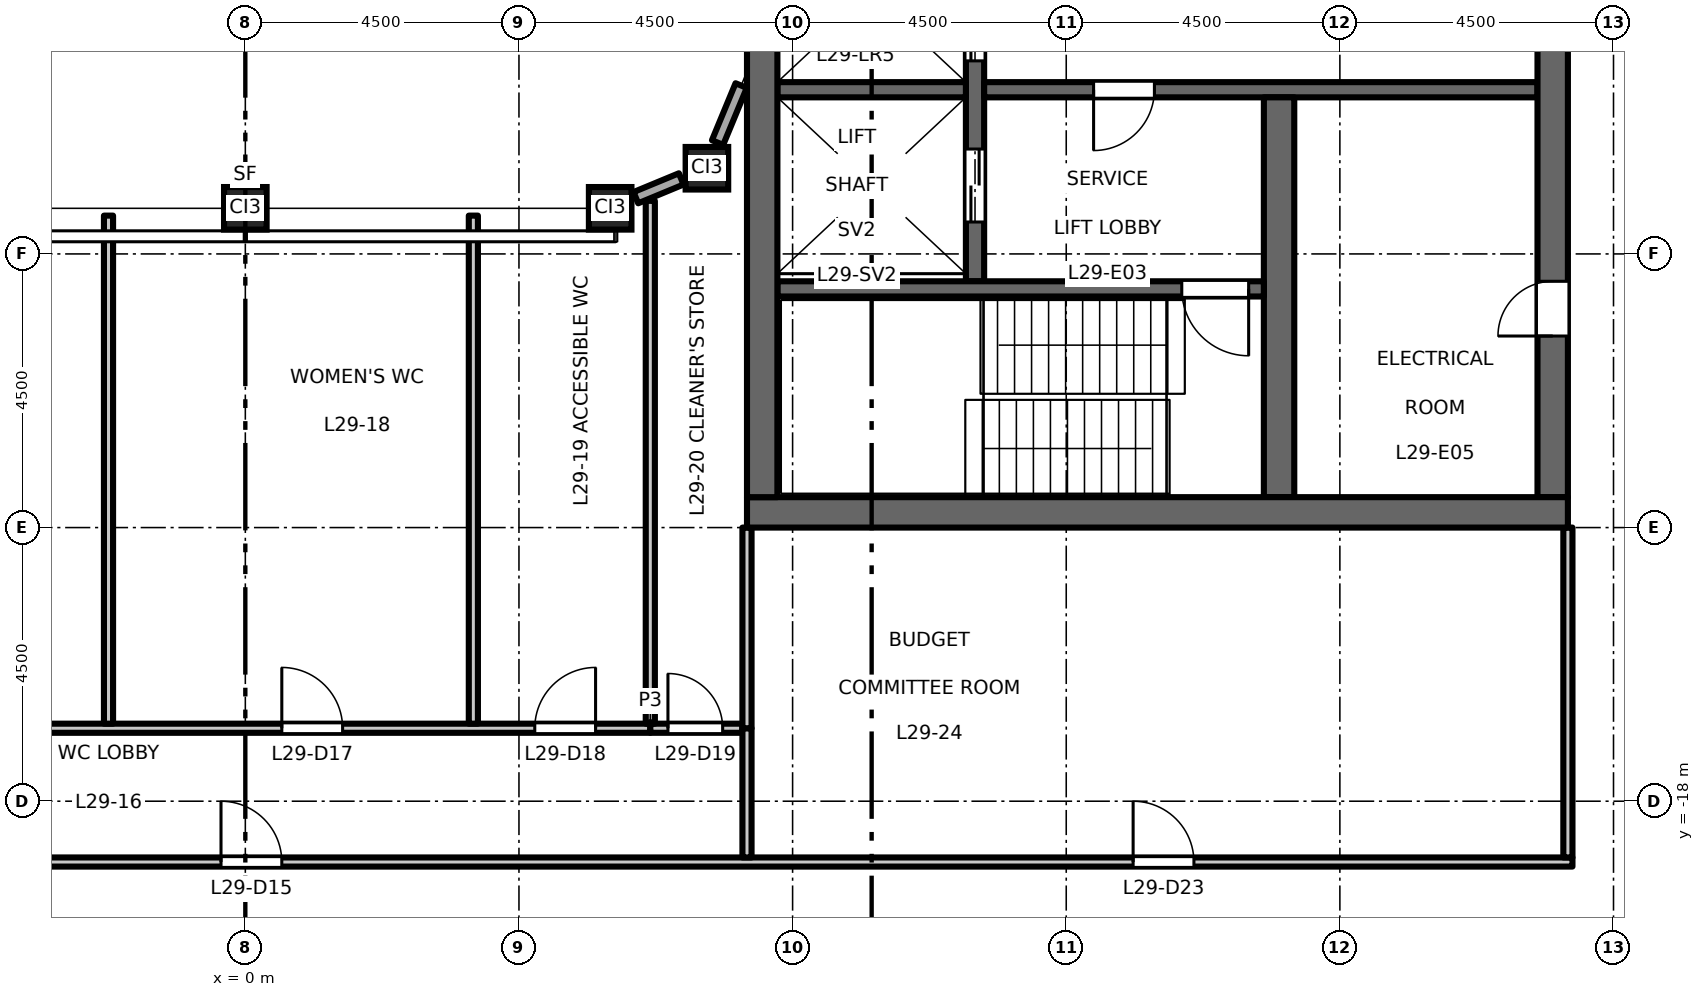
"""IFC4 building model, lengths in metres.
Left out: names, types, materials, properties, quantities, classifications, styles, units other than length and angle.
Written with IfcOpenShell. Run it as: python <this file> out.ifc"""

import sys

from ifc_helpers import new_model, si_unit, direction, frame, frame_2d, origin, origin_2d, place, context, subcontext, project, spatial, rectangle, hollow_rectangle, extrude, element, fill, save


model = new_model("IFC4")
c1 = context("Model", 3, precision=1e-05, world=origin(), true_north=direction((0.0, 1.0)))
c2 = subcontext(c1, "Body", "Model", "MODEL_VIEW")
j1 = project(units=[si_unit("LENGTHUNIT", "METRE"), si_unit("PLANEANGLEUNIT", "RADIAN")], contexts=[c1])
p1 = place(None, origin())
s1 = spatial("IfcSite", under=j1, at=p1, CompositionType="ELEMENT")
p2 = place(p1, origin())
s2 = spatial("IfcBuilding", under=s1, at=p2, CompositionType="ELEMENT")
p3 = place(p2, frame((0.0, 0.0, 136.2)))
s3 = spatial("IfcBuildingStorey", under=s2, at=p3, CompositionType="ELEMENT", Elevation=136.2)
for number, where, z_axis, x_axis in (
    (1, (0.0, -8.25, 0.0), (0.0, 0.0, 1.0), (1.0, 0.0, 0.0)),
    (2, (6.0, -8.25, 0.0), (0.0, 0.0, 1.0), (1.0, 0.0, 0.0)),
    (3, (7.591, -7.591, 0.0), (0.0, 0.0, 1.0), (1.0, 0.0, 0.0)),
):
    element("IfcColumn", number, at=place(p3, frame(where, z_axis=z_axis, x_axis=x_axis)), inside=s3, PredefinedType="COLUMN", context=c2, shape_type="SweptSolid", body=[
        extrude(hollow_rectangle(XDim=0.7, YDim=0.7, WallThickness=0.04, at=origin_2d()), origin(), (0.0, 0.0, 1.0), 4.5),
    ])
p4 = place(p3, frame((12.0, -9.45, 0.0), z_axis=(0.0, 0.0, 1.0), x_axis=(0.0, 1.0, 0.0)))
e4 = element("IfcWall", 4, at=p4, inside=s3, PredefinedType="SHEAR", context=c2, shape_type="SweptSolid", body=[
    extrude(rectangle(XDim=18.9, YDim=0.3, at=frame_2d((9.45, 0.0))), origin(), (0.0, 0.0, 1.0), 4.35),
])
p5 = place(p4, frame((3.625, 0.0, 0.0)))
e5 = element("IfcOpeningElement", 5, at=p5, cuts=e4, PredefinedType="OPENING", context=c2, shape_type="SweptSolid", body=[
    extrude(rectangle(XDim=1.1, YDim=2.1, at=frame_2d((0.55, 1.05))), frame((0.0, 0.16, 0.0), z_axis=(0.0, -1.0, 0.0), x_axis=(1.0, 0.0, 0.0)), (0.0, 0.0, 1.0), 0.32),
])
p6 = place(p4, frame((6.775, 0.0, 0.0)))
e6 = element("IfcOpeningElement", 6, at=p6, cuts=e4, PredefinedType="OPENING", context=c2, shape_type="SweptSolid", body=[
    extrude(rectangle(XDim=1.1, YDim=2.1, at=frame_2d((0.55, 1.05))), frame((0.0, 0.16, 0.0), z_axis=(0.0, -1.0, 0.0), x_axis=(1.0, 0.0, 0.0)), (0.0, 0.0, 1.0), 0.32),
])
p7 = place(p4, frame((9.925, 0.0, 0.0)))
e7 = element("IfcOpeningElement", 7, at=p7, cuts=e4, PredefinedType="OPENING", context=c2, shape_type="SweptSolid", body=[
    extrude(rectangle(XDim=1.1, YDim=2.1, at=frame_2d((0.55, 1.05))), frame((0.0, 0.16, 0.0), z_axis=(0.0, -1.0, 0.0), x_axis=(1.0, 0.0, 0.0)), (0.0, 0.0, 1.0), 0.32),
])
p8 = place(p4, frame((13.075, 0.0, 0.0)))
e8 = element("IfcOpeningElement", 8, at=p8, cuts=e4, PredefinedType="OPENING", context=c2, shape_type="SweptSolid", body=[
    extrude(rectangle(XDim=1.1, YDim=2.1, at=frame_2d((0.55, 1.05))), frame((0.0, 0.16, 0.0), z_axis=(0.0, -1.0, 0.0), x_axis=(1.0, 0.0, 0.0)), (0.0, 0.0, 1.0), 0.32),
])
p9 = place(p4, frame((16.725, 0.0, 0.0)))
e9 = element("IfcOpeningElement", 9, at=p9, cuts=e4, PredefinedType="OPENING", context=c2, shape_type="SweptSolid", body=[
    extrude(rectangle(XDim=1.2, YDim=2.1, at=frame_2d((0.6, 1.05))), frame((0.0, 0.16, 0.0), z_axis=(0.0, -1.0, 0.0), x_axis=(1.0, 0.0, 0.0)), (0.0, 0.0, 1.0), 0.32),
])
p10 = place(p4, frame((0.975, 0.0, 0.0)))
e10 = element("IfcOpeningElement", 10, at=p10, cuts=e4, PredefinedType="OPENING", context=c2, shape_type="SweptSolid", body=[
    extrude(rectangle(XDim=1.2, YDim=2.1, at=frame_2d((0.6, 1.05))), frame((0.0, 0.16, 0.0), z_axis=(0.0, -1.0, 0.0), x_axis=(1.0, 0.0, 0.0)), (0.0, 0.0, 1.0), 0.32),
])
p11 = place(p3, frame((12.15, -6.3, 0.0), z_axis=(0.0, 0.0, 1.0), x_axis=(1.0, 0.0, 0.0)))
e11 = element("IfcWall", 11, at=p11, inside=s3, PredefinedType="SHEAR", context=c2, shape_type="SweptSolid", body=[
    extrude(rectangle(XDim=9.1, YDim=0.25, at=frame_2d((4.55, 0.0))), origin(), (0.0, 0.0, 1.0), 4.35),
])
p12 = place(p11, frame((1.8, 0.0, 0.0)))
e12 = element("IfcOpeningElement", 12, at=p12, cuts=e11, PredefinedType="OPENING", context=c2, shape_type="SweptSolid", body=[
    extrude(rectangle(XDim=1.0, YDim=2.1, at=frame_2d((0.5, 1.05))), frame((0.0, 0.135, 0.0), z_axis=(0.0, -1.0, 0.0), x_axis=(1.0, 0.0, 0.0)), (0.0, 0.0, 1.0), 0.27),
])
p13 = place(p3, frame((21.5, -13.0, 0.0), z_axis=(0.0, 0.0, 1.0), x_axis=(0.0, 1.0, 0.0)))
e13 = element("IfcWall", 13, at=p13, inside=s3, PredefinedType="SHEAR", context=c2, shape_type="SweptSolid", body=[
    extrude(rectangle(XDim=26.0, YDim=0.5, at=frame_2d((13.0, 0.0))), origin(), (0.0, 0.0, 1.0), 4.35),
])
p14 = place(p13, frame((16.825, 0.0, 0.0)))
e14 = element("IfcOpeningElement", 14, at=p14, cuts=e13, PredefinedType="OPENING", context=c2, shape_type="SweptSolid", body=[
    extrude(rectangle(XDim=1.8, YDim=2.1, at=frame_2d((0.9, 1.05))), frame((0.0, 0.26, 0.0), z_axis=(0.0, -1.0, 0.0), x_axis=(1.0, 0.0, 0.0)), (0.0, 0.0, 1.0), 0.52),
])
p15 = place(p13, frame((7.375, 0.0, 0.0)))
e15 = element("IfcOpeningElement", 15, at=p15, cuts=e13, PredefinedType="OPENING", context=c2, shape_type="SweptSolid", body=[
    extrude(rectangle(XDim=1.8, YDim=2.1, at=frame_2d((0.9, 1.05))), frame((0.0, 0.26, 0.0), z_axis=(0.0, -1.0, 0.0), x_axis=(1.0, 0.0, 0.0)), (0.0, 0.0, 1.0), 0.52),
])
p16 = place(p13, frame((2.65, 0.0, 0.0)))
e16 = element("IfcOpeningElement", 16, at=p16, cuts=e13, PredefinedType="OPENING", context=c2, shape_type="SweptSolid", body=[
    extrude(rectangle(XDim=0.9, YDim=2.1, at=frame_2d((0.45, 1.05))), frame((0.0, 0.26, 0.0), z_axis=(0.0, -1.0, 0.0), x_axis=(1.0, 0.0, 0.0)), (0.0, 0.0, 1.0), 0.52),
])
p17 = place(p3, frame((17.0, -13.0, 0.0), z_axis=(0.0, 0.0, 1.0), x_axis=(0.0, 1.0, 0.0)))
e17 = element("IfcWall", 17, at=p17, inside=s3, PredefinedType="SHEAR", context=c2, shape_type="SweptSolid", body=[
    extrude(rectangle(XDim=6.575, YDim=0.5, at=frame_2d((3.288, 0.0))), origin(), (0.0, 0.0, 1.0), 4.35),
])
p18 = place(p3, frame((8.75, -6.3, 0.0), z_axis=(0.0, 0.0, 1.0), x_axis=(1.0, 0.0, 0.0)))
e18 = element("IfcWall", 18, at=p18, inside=s3, PredefinedType="SHEAR", context=c2, shape_type="SweptSolid", body=[
    extrude(rectangle(XDim=3.1, YDim=0.25, at=frame_2d((1.55, 0.0))), origin(), (0.0, 0.0, 1.0), 4.35),
])
p19 = place(p3, frame((8.75, -9.575, 0.0), z_axis=(0.0, 0.0, 1.0), x_axis=(1.0, 0.0, 0.0)))
e19 = element("IfcWall", 19, at=p19, inside=s3, PredefinedType="SHEAR", context=c2, shape_type="SweptSolid", body=[
    extrude(rectangle(XDim=8.0, YDim=0.25, at=frame_2d((4.0, 0.0))), origin(), (0.0, 0.0, 1.0), 4.35),
])
p20 = place(p19, frame((6.65, 0.0, 0.0)))
e20 = element("IfcOpeningElement", 20, at=p20, cuts=e19, PredefinedType="OPENING", context=c2, shape_type="SweptSolid", body=[
    extrude(rectangle(XDim=1.1, YDim=2.1, at=frame_2d((0.55, 1.05))), frame((0.0, 0.135, 0.0), z_axis=(0.0, -1.0, 0.0), x_axis=(1.0, 0.0, 0.0)), (0.0, 0.0, 1.0), 0.27),
])
p21 = place(p3, frame((8.25, -13.25, 0.0), z_axis=(0.0, 0.0, 1.0), x_axis=(1.0, 0.0, 0.0)))
e21 = element("IfcWall", 21, at=p21, inside=s3, PredefinedType="SHEAR", context=c2, shape_type="SweptSolid", body=[
    extrude(rectangle(XDim=13.5, YDim=0.5, at=frame_2d((6.75, 0.0))), origin(), (0.0, 0.0, 1.0), 4.35),
])
p22 = place(p3, frame((8.5, -13.0, 0.0), z_axis=(0.0, 0.0, 1.0), x_axis=(0.0, 1.0, 0.0)))
e22 = element("IfcWall", 22, at=p22, inside=s3, PredefinedType="SHEAR", context=c2, shape_type="SweptSolid", body=[
    extrude(rectangle(XDim=26.0, YDim=0.5, at=frame_2d((13.0, 0.0))), origin(), (0.0, 0.0, 1.0), 4.35),
])
p23 = place(p3, frame((6.423, -8.075, 0.0), z_axis=(0.0, 0.0, 1.0), x_axis=(0.923817771127, 0.382832503518, 0.0)))
e23 = element("IfcWall", 23, at=p23, inside=s3, PredefinedType="STANDARD", context=c2, shape_type="SweptSolid", body=[
    extrude(rectangle(XDim=0.807, YDim=0.2, at=frame_2d((0.404, 0.0))), origin(), (0.0, 0.0, 1.0), 3.826),
])
p24 = place(p3, frame((7.766, -7.168, 0.0), z_axis=(0.0, 0.0, 1.0), x_axis=(0.382769662028, 0.923843810301, 0.0)))
e24 = element("IfcWall", 24, at=p24, inside=s3, PredefinedType="STANDARD", context=c2, shape_type="SweptSolid", body=[
    extrude(rectangle(XDim=1.015, YDim=0.2, at=frame_2d((0.507, 0.0))), origin(), (0.0, 0.0, 1.0), 3.826),
])
p25 = place(p3, frame((-21.825, -19.0, 0.0), z_axis=(0.0, 0.0, 1.0), x_axis=(1.0, 0.0, 0.0)))
e25 = element("IfcWall", 25, at=p25, inside=s3, PredefinedType="PARTITIONING", context=c2, shape_type="SweptSolid", body=[
    extrude(rectangle(XDim=43.65, YDim=0.15, at=frame_2d((21.825, 0.0))), origin(), (0.0, 0.0, 1.0), 4.35),
])
p26 = place(p25, frame((21.425, 0.0, 0.0)))
e26 = element("IfcOpeningElement", 26, at=p26, cuts=e25, PredefinedType="OPENING", context=c2, shape_type="SweptSolid", body=[
    extrude(rectangle(XDim=1.0, YDim=2.1, at=frame_2d((0.5, 1.05))), frame((0.0, 0.085, 0.0), z_axis=(0.0, -1.0, 0.0), x_axis=(1.0, 0.0, 0.0)), (0.0, 0.0, 1.0), 0.17),
])
p27 = place(p25, frame((6.425, 0.0, 0.0)))
e27 = element("IfcOpeningElement", 27, at=p27, cuts=e25, PredefinedType="OPENING", context=c2, shape_type="SweptSolid", body=[
    extrude(rectangle(XDim=1.0, YDim=2.1, at=frame_2d((0.5, 1.05))), frame((0.0, 0.085, 0.0), z_axis=(0.0, -1.0, 0.0), x_axis=(1.0, 0.0, 0.0)), (0.0, 0.0, 1.0), 0.17),
])
p28 = place(p25, frame((36.425, 0.0, 0.0)))
e28 = element("IfcOpeningElement", 28, at=p28, cuts=e25, PredefinedType="OPENING", context=c2, shape_type="SweptSolid", body=[
    extrude(rectangle(XDim=1.0, YDim=2.1, at=frame_2d((0.5, 1.05))), frame((0.0, 0.085, 0.0), z_axis=(0.0, -1.0, 0.0), x_axis=(1.0, 0.0, 0.0)), (0.0, 0.0, 1.0), 0.17),
])
p29 = place(p3, frame((-8.175, -16.8, 0.0), z_axis=(0.0, 0.0, 1.0), x_axis=(1.0, 0.0, 0.0)))
e29 = element("IfcWall", 29, at=p29, inside=s3, PredefinedType="PARTITIONING", context=c2, shape_type="SweptSolid", body=[
    extrude(rectangle(XDim=14.835, YDim=0.15, at=frame_2d((7.417, 0.0))), origin(), (0.0, 0.0, 1.0), 4.35),
])
p30 = place(p29, frame((2.525, 0.0, 0.0)))
e30 = element("IfcOpeningElement", 30, at=p30, cuts=e29, PredefinedType="OPENING", context=c2, shape_type="SweptSolid", body=[
    extrude(rectangle(XDim=1.0, YDim=2.1, at=frame_2d((0.5, 1.05))), frame((0.0, 0.085, 0.0), z_axis=(0.0, -1.0, 0.0), x_axis=(1.0, 0.0, 0.0)), (0.0, 0.0, 1.0), 0.17),
])
p31 = place(p29, frame((8.775, 0.0, 0.0)))
e31 = element("IfcOpeningElement", 31, at=p31, cuts=e29, PredefinedType="OPENING", context=c2, shape_type="SweptSolid", body=[
    extrude(rectangle(XDim=1.0, YDim=2.1, at=frame_2d((0.5, 1.05))), frame((0.0, 0.085, 0.0), z_axis=(0.0, -1.0, 0.0), x_axis=(1.0, 0.0, 0.0)), (0.0, 0.0, 1.0), 0.17),
])
p32 = place(p29, frame((12.935, 0.0, 0.0)))
e32 = element("IfcOpeningElement", 32, at=p32, cuts=e29, PredefinedType="OPENING", context=c2, shape_type="SweptSolid", body=[
    extrude(rectangle(XDim=1.0, YDim=2.1, at=frame_2d((0.5, 1.05))), frame((0.0, 0.085, 0.0), z_axis=(0.0, -1.0, 0.0), x_axis=(1.0, 0.0, 0.0)), (0.0, 0.0, 1.0), 0.17),
])
p33 = place(p3, frame((6.66, -16.8, 0.0), z_axis=(0.0, 0.0, 1.0), x_axis=(1.0, 0.0, 0.0)))
e33 = element("IfcWall", 33, at=p33, inside=s3, PredefinedType="PARTITIONING", context=c2, shape_type="SweptSolid", body=[
    extrude(rectangle(XDim=1.515, YDim=0.15, at=frame_2d((0.758, 0.0))), origin(), (0.0, 0.0, 1.0), 4.35),
])
p34 = place(p33, frame((0.29, 0.0, 0.0)))
e34 = element("IfcOpeningElement", 34, at=p34, cuts=e33, PredefinedType="OPENING", context=c2, shape_type="SweptSolid", body=[
    extrude(rectangle(XDim=0.9, YDim=2.1, at=frame_2d((0.45, 1.05))), frame((0.0, 0.085, 0.0), z_axis=(0.0, -1.0, 0.0), x_axis=(1.0, 0.0, 0.0)), (0.0, 0.0, 1.0), 0.17),
])
for number, where, z_axis, x_axis in (
    (35, (-2.25, -16.725, 0.0), (0.0, 0.0, 1.0), (0.0, 1.0, 0.0)),
    (36, (3.75, -16.725, 0.0), (0.0, 0.0, 1.0), (0.0, 1.0, 0.0)),
):
    element("IfcWall", number, at=place(p3, frame(where, z_axis=z_axis, x_axis=x_axis)), inside=s3, PredefinedType="PARTITIONING", context=c2, shape_type="SweptSolid", body=[
        extrude(rectangle(XDim=8.355, YDim=0.15, at=frame_2d((4.177, 0.0))), origin(), (0.0, 0.0, 1.0), 4.35),
    ])
p35 = place(p3, frame((6.66, -16.725, 0.0), z_axis=(0.0, 0.0, 1.0), x_axis=(0.0, 1.0, 0.0)))
e37 = element("IfcWall", 37, at=p35, inside=s3, PredefinedType="PARTITIONING", context=c2, shape_type="SweptSolid", body=[
    extrude(rectangle(XDim=8.598, YDim=0.15, at=frame_2d((4.299, 0.0))), origin(), (0.0, 0.0, 1.0), 4.35),
])
p36 = place(p3, frame((8.25, -18.925, 0.0), z_axis=(0.0, 0.0, 1.0), x_axis=(0.0, 1.0, 0.0)))
e38 = element("IfcWall", 38, at=p36, inside=s3, PredefinedType="PARTITIONING", context=c2, shape_type="SweptSolid", body=[
    extrude(rectangle(XDim=2.125, YDim=0.15, at=frame_2d((1.062, 0.0))), origin(), (0.0, 0.0, 1.0), 4.35),
])
p37 = place(p3, frame((8.25, -16.8, 0.0), z_axis=(0.0, 0.0, 1.0), x_axis=(0.0, 1.0, 0.0)))
e39 = element("IfcWall", 39, at=p37, inside=s3, PredefinedType="PARTITIONING", context=c2, shape_type="SweptSolid", body=[
    extrude(rectangle(XDim=3.3, YDim=0.15, at=frame_2d((1.65, 0.0))), origin(), (0.0, 0.0, 1.0), 4.35),
])
p38 = place(p3, frame((21.75, -18.925, 0.0), z_axis=(0.0, 0.0, 1.0), x_axis=(0.0, 1.0, 0.0)))
e40 = element("IfcWall", 40, at=p38, inside=s3, PredefinedType="PARTITIONING", context=c2, shape_type="SweptSolid", body=[
    extrude(rectangle(XDim=5.425, YDim=0.15, at=frame_2d((2.712, 0.0))), origin(), (0.0, 0.0, 1.0), 4.35),
])
p39 = place(p12, origin())
e41 = element("IfcDoor", 41, at=p39, inside=s3, OperationType="SINGLE_SWING_LEFT", PredefinedType="DOOR", context=c2, shape_type="SweptSolid", body=[
    extrude(rectangle(XDim=1.0, YDim=2.1, at=frame_2d((0.5, 1.05))), frame((0.0, 0.025, 0.0), z_axis=(0.0, -1.0, 0.0), x_axis=(1.0, 0.0, 0.0)), (0.0, 0.0, 1.0), 0.05),
])
fill(e12, e41)
p40 = place(p20, origin())
e42 = element("IfcDoor", 42, at=p40, inside=s3, OperationType="SINGLE_SWING_RIGHT", PredefinedType="DOOR", context=c2, shape_type="SweptSolid", body=[
    extrude(rectangle(XDim=1.1, YDim=2.1, at=frame_2d((0.55, 1.05))), frame((0.0, 0.025, 0.0), z_axis=(0.0, -1.0, 0.0), x_axis=(1.0, 0.0, 0.0)), (0.0, 0.0, 1.0), 0.05),
])
fill(e20, e42)
p41 = place(p5, origin())
e43 = element("IfcDoor", 43, at=p41, inside=s3, OperationType="DOUBLE_DOOR_SLIDING", PredefinedType="DOOR", context=c2, shape_type="SweptSolid", body=[
    extrude(rectangle(XDim=1.1, YDim=2.1, at=frame_2d((0.55, 1.05))), frame((0.0, 0.025, 0.0), z_axis=(0.0, -1.0, 0.0), x_axis=(1.0, 0.0, 0.0)), (0.0, 0.0, 1.0), 0.05),
])
fill(e5, e43)
p42 = place(p10, origin())
e44 = element("IfcDoor", 44, at=p42, inside=s3, OperationType="DOUBLE_DOOR_SLIDING", PredefinedType="DOOR", context=c2, shape_type="SweptSolid", body=[
    extrude(rectangle(XDim=1.2, YDim=2.1, at=frame_2d((0.6, 1.05))), frame((0.0, 0.025, 0.0), z_axis=(0.0, -1.0, 0.0), x_axis=(1.0, 0.0, 0.0)), (0.0, 0.0, 1.0), 0.05),
])
fill(e10, e44)
p43 = place(p16, origin())
e45 = element("IfcDoor", 45, at=p43, inside=s3, OperationType="SINGLE_SWING_RIGHT", PredefinedType="DOOR", context=c2, shape_type="SweptSolid", body=[
    extrude(rectangle(XDim=0.9, YDim=2.1, at=frame_2d((0.45, 1.05))), frame((0.0, 0.025, 0.0), z_axis=(0.0, -1.0, 0.0), x_axis=(1.0, 0.0, 0.0)), (0.0, 0.0, 1.0), 0.05),
])
fill(e16, e45)
p44 = place(p26, origin())
e46 = element("IfcDoor", 46, at=p44, inside=s3, OperationType="SINGLE_SWING_LEFT", PredefinedType="DOOR", context=c2, shape_type="SweptSolid", body=[
    extrude(rectangle(XDim=1.0, YDim=2.1, at=frame_2d((0.5, 1.05))), frame((0.0, 0.025, 0.0), z_axis=(0.0, -1.0, 0.0), x_axis=(1.0, 0.0, 0.0)), (0.0, 0.0, 1.0), 0.05),
])
fill(e26, e46)
p45 = place(p31, origin())
e47 = element("IfcDoor", 47, at=p45, inside=s3, OperationType="SINGLE_SWING_LEFT", PredefinedType="DOOR", context=c2, shape_type="SweptSolid", body=[
    extrude(rectangle(XDim=1.0, YDim=2.1, at=frame_2d((0.5, 1.05))), frame((0.0, 0.025, 0.0), z_axis=(0.0, -1.0, 0.0), x_axis=(1.0, 0.0, 0.0)), (0.0, 0.0, 1.0), 0.05),
])
fill(e31, e47)
p46 = place(p32, origin())
e48 = element("IfcDoor", 48, at=p46, inside=s3, OperationType="SINGLE_SWING_RIGHT", PredefinedType="DOOR", context=c2, shape_type="SweptSolid", body=[
    extrude(rectangle(XDim=1.0, YDim=2.1, at=frame_2d((0.5, 1.05))), frame((0.0, 0.025, 0.0), z_axis=(0.0, -1.0, 0.0), x_axis=(1.0, 0.0, 0.0)), (0.0, 0.0, 1.0), 0.05),
])
fill(e32, e48)
p47 = place(p34, origin())
e49 = element("IfcDoor", 49, at=p47, inside=s3, OperationType="SINGLE_SWING_LEFT", PredefinedType="DOOR", context=c2, shape_type="SweptSolid", body=[
    extrude(rectangle(XDim=0.9, YDim=2.1, at=frame_2d((0.45, 1.05))), frame((0.0, 0.025, 0.0), z_axis=(0.0, -1.0, 0.0), x_axis=(1.0, 0.0, 0.0)), (0.0, 0.0, 1.0), 0.05),
])
fill(e34, e49)
p48 = place(p28, origin())
e50 = element("IfcDoor", 50, at=p48, inside=s3, OperationType="SINGLE_SWING_LEFT", PredefinedType="DOOR", context=c2, shape_type="SweptSolid", body=[
    extrude(rectangle(XDim=1.0, YDim=2.1, at=frame_2d((0.5, 1.05))), frame((0.0, 0.025, 0.0), z_axis=(0.0, -1.0, 0.0), x_axis=(1.0, 0.0, 0.0)), (0.0, 0.0, 1.0), 0.05),
])
fill(e28, e50)
save(model, sys.argv[1])
